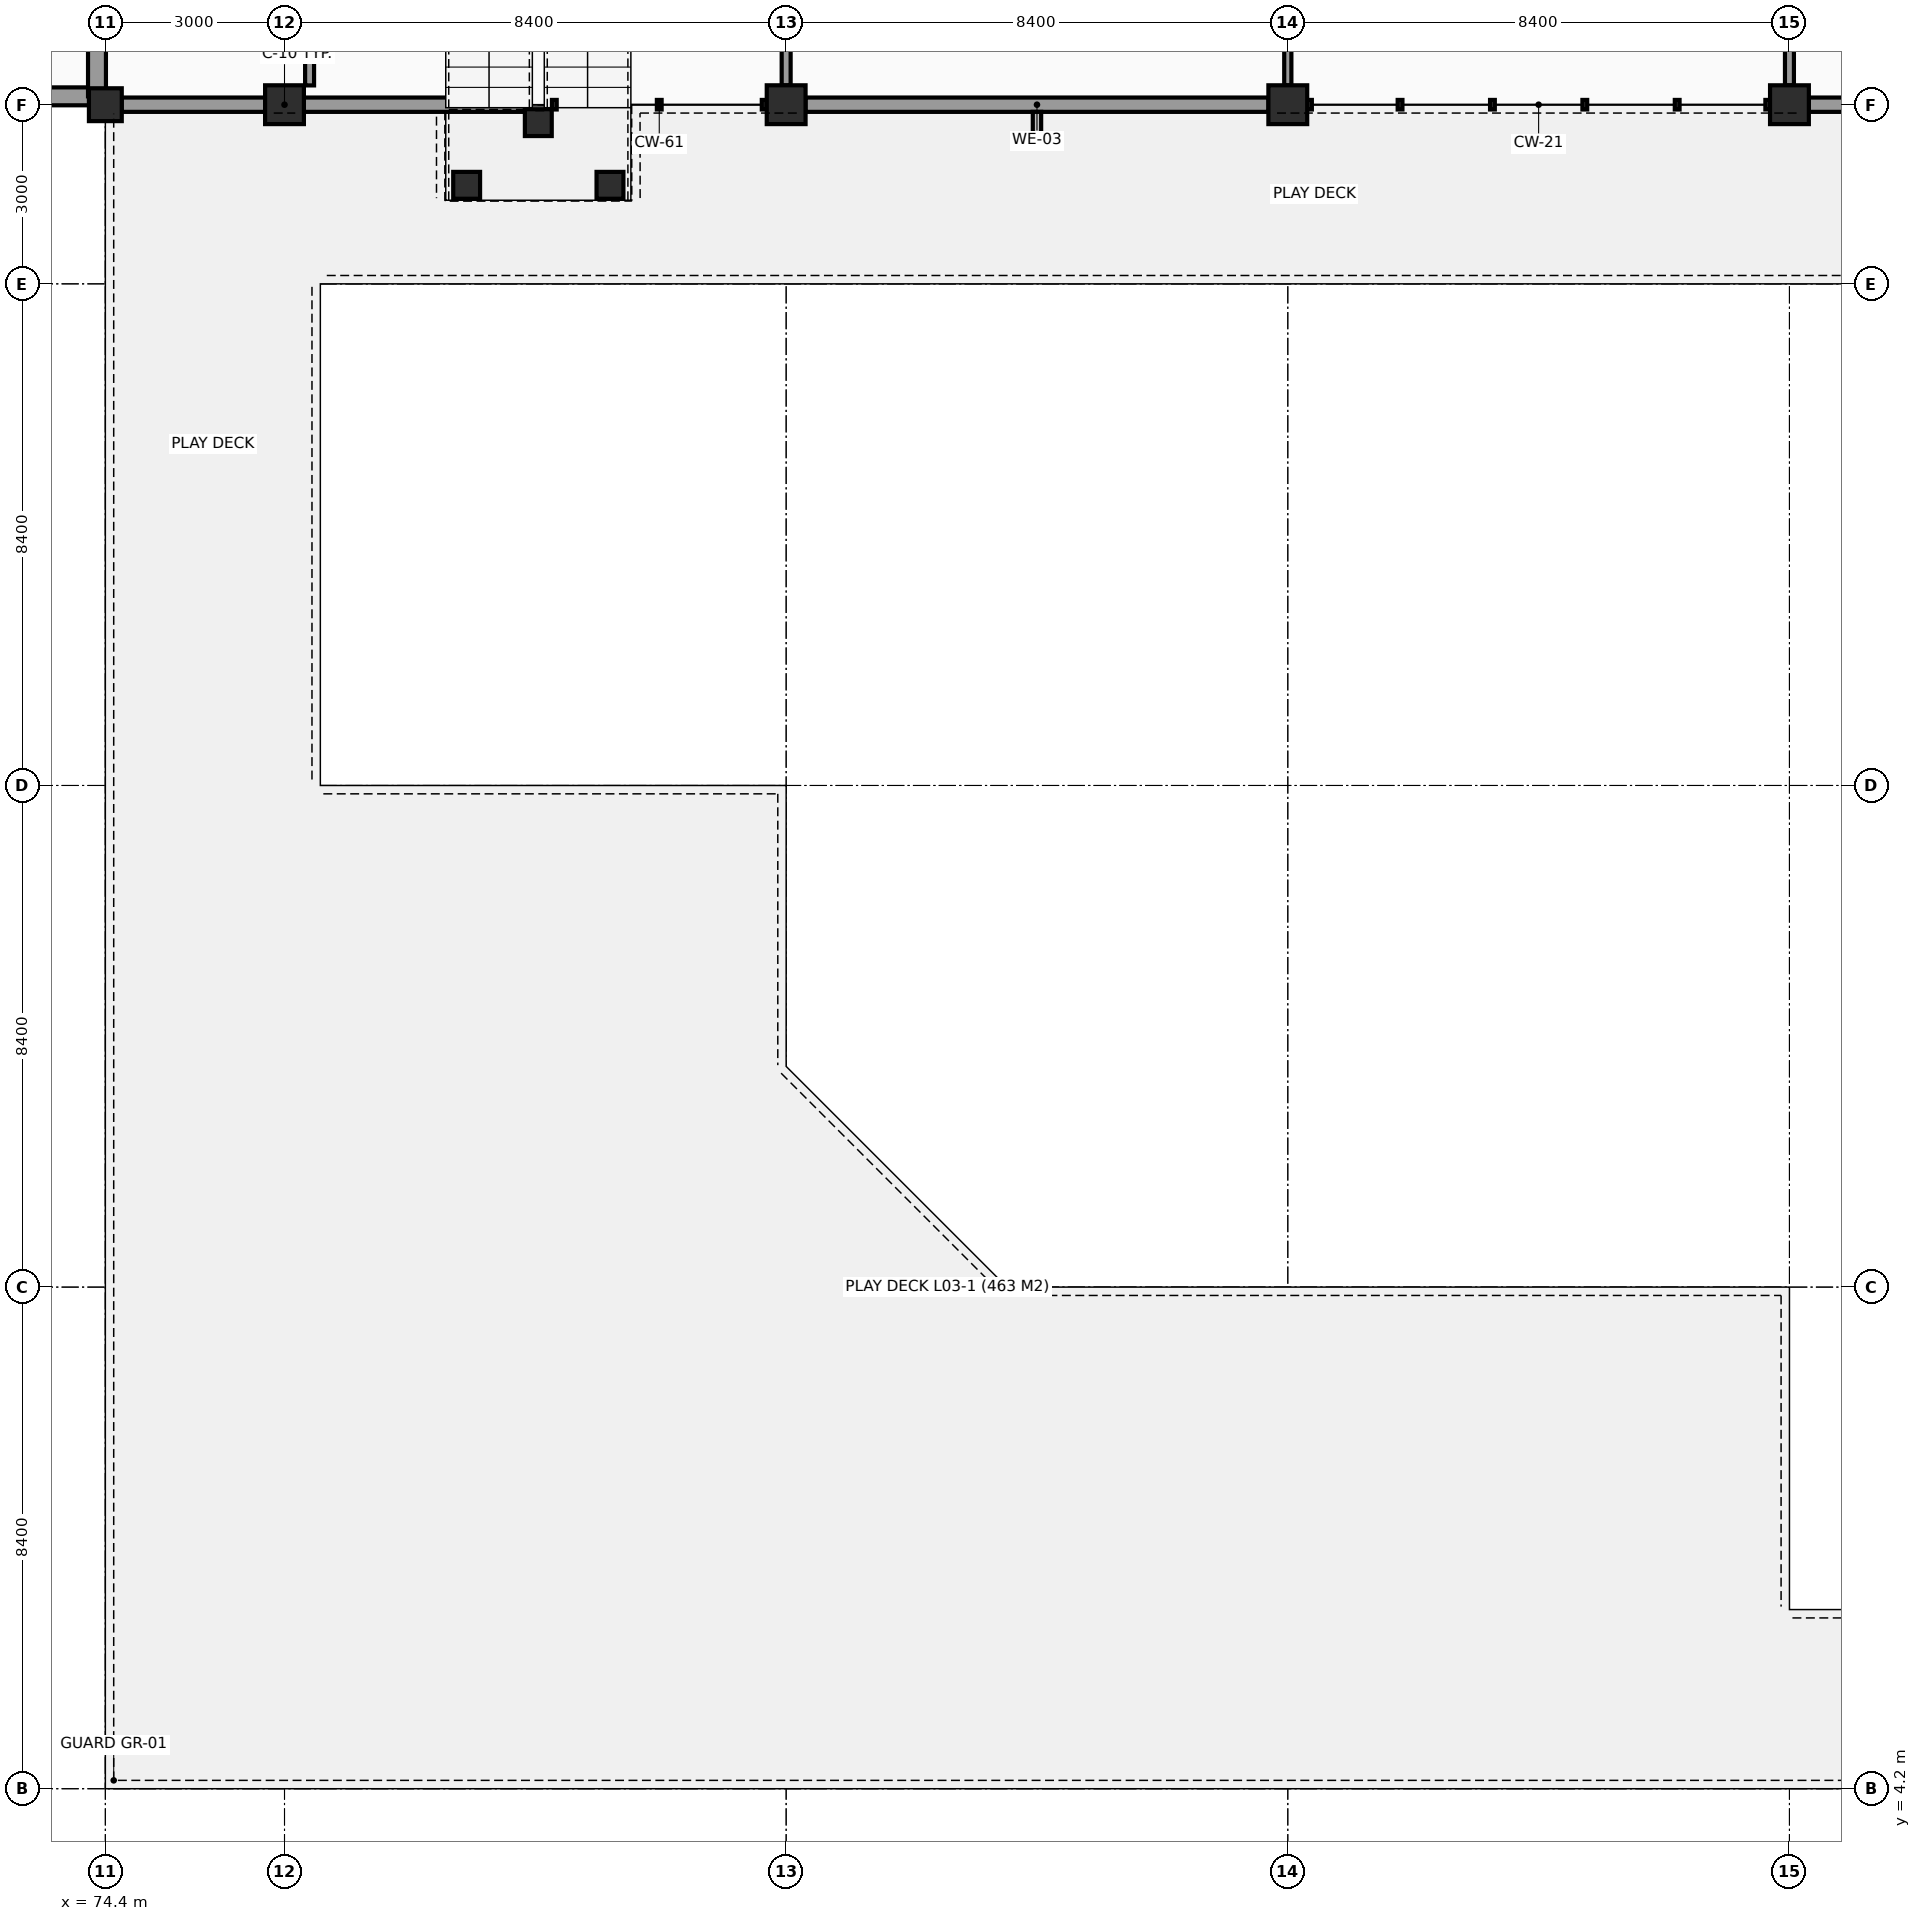
"""IFC4 building model, lengths in metres.
Left out: names, types, materials, properties, quantities, classifications, styles, units other than length and angle.
Written with IfcOpenShell. Run it as: python <this file> out.ifc"""

import sys

from ifc_helpers import new_model, si_unit, direction, frame, frame_2d, origin, origin_2d, place, context, subcontext, project, spatial, rectangle, circle, extrude, element, save


model = new_model("IFC4")
c1 = context("Model", 3, precision=1e-05, world=origin(), true_north=direction((0.0, 1.0)))
c2 = subcontext(c1, "Body", "Model", "MODEL_VIEW")
j1 = project(units=[si_unit("LENGTHUNIT", "METRE"), si_unit("PLANEANGLEUNIT", "RADIAN")], contexts=[c1])
p1 = place(None, origin())
s1 = spatial("IfcSite", under=j1, at=p1, CompositionType="ELEMENT")
p2 = place(p1, origin())
s2 = spatial("IfcBuilding", under=s1, at=p2, CompositionType="ELEMENT")
p3 = place(p2, frame((0.0, 0.0, 11.4)))
s3 = spatial("IfcBuildingStorey", under=s2, at=p3, CompositionType="ELEMENT", Elevation=11.4)
p4 = place(p3, frame((74.4, 32.4, 0.0), z_axis=(0.0, 0.0, 1.0), x_axis=(1.0, 0.0, 0.0)))
e1 = element("IfcColumn", 1, at=p4, inside=s3, PredefinedType="COLUMN", context=c2, shape_type="SweptSolid", body=[
    extrude(rectangle(XDim=0.55, YDim=0.55, at=origin_2d()), origin(), (0.0, 0.0, 1.0), 3.6),
])
for number, where, z_axis, x_axis in (
    (2, (77.4, 32.4, 0.0), (0.0, 0.0, 1.0), (1.0, 0.0, 0.0)),
    (3, (85.8, 32.4, 0.0), (0.0, 0.0, 1.0), (1.0, 0.0, 0.0)),
    (4, (94.2, 32.4, 0.0), (0.0, 0.0, 1.0), (1.0, 0.0, 0.0)),
    (5, (102.6, 32.4, 0.0), (0.0, 0.0, 1.0), (1.0, 0.0, 0.0)),
):
    element("IfcColumn", number, at=place(p3, frame(where, z_axis=z_axis, x_axis=x_axis)), inside=s3, PredefinedType="COLUMN", context=c2, shape_type="SweptSolid", body=[
        extrude(circle(Radius=0.325, at=origin_2d()), origin(), (0.0, 0.0, 1.0), 3.34),
    ])
for number, where, z_axis, x_axis in (
    (6, (82.85, 31.05, 0.0), (0.0, 0.0, 1.0), (1.0, 0.0, 0.0)),
    (7, (80.45, 31.05, 0.0), (0.0, 0.0, 1.0), (1.0, 0.0, 0.0)),
    (8, (81.65, 32.1, 0.0), (0.0, 0.0, 1.0), (1.0, 0.0, 0.0)),
):
    element("IfcColumn", number, at=place(p3, frame(where, z_axis=z_axis, x_axis=x_axis)), inside=s3, PredefinedType="COLUMN", context=c2, shape_type="SweptSolid", body=[
        extrude(rectangle(XDim=0.45, YDim=0.45, at=origin_2d()), origin(), (0.0, 0.0, 1.0), 3.4),
    ])
p5 = place(p3, frame((109.552, 32.4, 0.0), z_axis=(0.0, 0.0, 1.0), x_axis=(-1.0, 0.0, 0.0)))
e9 = element("IfcWall", 9, at=p5, inside=s3, PredefinedType="SOLIDWALL", context=c2, shape_type="SweptSolid", body=[
    extrude(rectangle(XDim=6.629, YDim=0.24, at=frame_2d((3.314, 0.0))), origin(), (0.0, 0.0, 1.0), 2.58),
])
p6 = place(p3, frame((93.877, 32.4, 0.0), z_axis=(0.0, 0.0, 1.0), x_axis=(-1.0, 0.0, 0.0)))
e10 = element("IfcWall", 10, at=p6, inside=s3, PredefinedType="SOLIDWALL", context=c2, shape_type="SweptSolid", body=[
    extrude(rectangle(XDim=7.754, YDim=0.24, at=frame_2d((3.877, 0.0))), origin(), (0.0, 0.0, 1.0), 2.58),
])
p7 = place(p3, frame((81.427, 32.4, 0.0), z_axis=(0.0, 0.0, 1.0), x_axis=(-1.0, 0.0, 0.0)))
e11 = element("IfcWall", 11, at=p7, inside=s3, PredefinedType="SOLIDWALL", context=c2, shape_type="SweptSolid", body=[
    extrude(rectangle(XDim=3.704, YDim=0.24, at=frame_2d((1.852, 0.0))), origin(), (0.0, 0.0, 1.0), 3.34),
])
p8 = place(p3, frame((77.077, 32.4, 0.0), z_axis=(0.0, 0.0, 1.0), x_axis=(-1.0, 0.0, 0.0)))
e12 = element("IfcWall", 12, at=p8, inside=s3, PredefinedType="SOLIDWALL", context=c2, shape_type="SweptSolid", body=[
    extrude(rectangle(XDim=2.404, YDim=0.24, at=frame_2d((1.202, 0.0))), origin(), (0.0, 0.0, 1.0), 2.58),
])
p9 = place(p3, frame((66.14, 32.54, 0.0), z_axis=(0.0, 0.0, 1.0), x_axis=(1.0, 0.0, 0.0)))
e13 = element("IfcWall", 13, at=p9, inside=s3, PredefinedType="SHEAR", context=c2, shape_type="SweptSolid", body=[
    extrude(rectangle(XDim=8.12, YDim=0.3, at=frame_2d((4.06, 0.0))), origin(), (0.0, 0.0, 1.0), 3.6),
])
p10 = place(p3, frame((74.26, 32.54, 0.0), z_axis=(0.0, 0.0, 1.0), x_axis=(0.0, 1.0, 0.0)))
e14 = element("IfcWall", 14, at=p10, inside=s3, PredefinedType="SHEAR", context=c2, shape_type="SweptSolid", body=[
    extrude(rectangle(XDim=4.24, YDim=0.3, at=frame_2d((2.12, 0.0))), origin(), (0.0, 0.0, 1.0), 3.6),
])
p11 = place(p3, frame((77.82, 32.723, 0.0), z_axis=(0.0, 0.0, 1.0), x_axis=(0.0, 1.0, 0.0)))
e15 = element("IfcWall", 15, at=p11, inside=s3, PredefinedType="PARTITIONING", context=c2, shape_type="SweptSolid", body=[
    extrude(rectangle(XDim=8.677, YDim=0.15, at=frame_2d((4.338, 0.0))), origin(), (0.0, 0.0, 1.0), 2.53),
])
p12 = place(p11, frame((3.388, 0.0, 0.0)))
e16 = element("IfcOpeningElement", 16, at=p12, cuts=e15, PredefinedType="OPENING", context=c2, shape_type="SweptSolid", body=[
    extrude(rectangle(XDim=1.9, YDim=2.3, at=frame_2d((0.95, 1.15))), frame((0.0, 0.085, 0.0), z_axis=(0.0, -1.0, 0.0), x_axis=(1.0, 0.0, 0.0)), (0.0, 0.0, 1.0), 0.17),
])
p13 = place(p3, frame((85.8, 41.152, 0.0), z_axis=(0.0, 0.0, 1.0), x_axis=(0.0, -1.0, 0.0)))
e17 = element("IfcWall", 17, at=p13, inside=s3, PredefinedType="PARTITIONING", context=c2, shape_type="SweptSolid", body=[
    extrude(rectangle(XDim=8.429, YDim=0.15, at=frame_2d((4.215, 0.0))), origin(), (0.0, 0.0, 1.0), 2.63),
])
p14 = place(p3, frame((94.2, 41.152, 0.0), z_axis=(0.0, 0.0, 1.0), x_axis=(0.0, -1.0, 0.0)))
e18 = element("IfcWall", 18, at=p14, inside=s3, PredefinedType="PARTITIONING", context=c2, shape_type="SweptSolid", body=[
    extrude(rectangle(XDim=8.429, YDim=0.12, at=frame_2d((4.215, 0.0))), origin(), (0.0, 0.0, 1.0), 2.68),
])
p15 = place(p3, frame((102.6, 41.152, 0.0), z_axis=(0.0, 0.0, 1.0), x_axis=(0.0, -1.0, 0.0)))
e19 = element("IfcWall", 19, at=p15, inside=s3, PredefinedType="PARTITIONING", context=c2, shape_type="SweptSolid", body=[
    extrude(rectangle(XDim=8.429, YDim=0.15, at=frame_2d((4.215, 0.0))), origin(), (0.0, 0.0, 1.0), 2.88),
])
p16 = place(p15, frame((3.314, 0.0, 0.0)))
e20 = element("IfcOpeningElement", 20, at=p16, cuts=e19, PredefinedType="OPENING", context=c2, shape_type="SweptSolid", body=[
    extrude(rectangle(XDim=1.8, YDim=2.25, at=frame_2d((0.9, 1.125))), frame((0.0, 0.085, 0.0), z_axis=(0.0, -1.0, 0.0), x_axis=(1.0, 0.0, 0.0)), (0.0, 0.0, 1.0), 0.17),
])
save(model, sys.argv[1])
